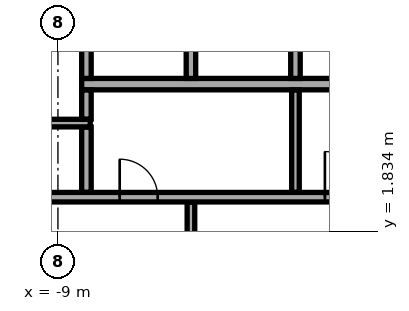
"""IFC4 building model, lengths in metres.
Left out: names, types, materials, properties, quantities, classifications, styles, units other than length and angle.
Written with IfcOpenShell. Run it as: python <this file> out.ifc"""

import sys

from ifc_helpers import new_model, si_unit, direction, frame, frame_2d, origin, place, context, subcontext, project, spatial, rectangle, extrude, element, fill, save


model = new_model("IFC4")
c1 = context("Model", 3, precision=1e-05, world=origin(), true_north=direction((0.0, 1.0)))
c2 = subcontext(c1, "Body", "Model", "MODEL_VIEW")
j1 = project(units=[si_unit("LENGTHUNIT", "METRE"), si_unit("PLANEANGLEUNIT", "RADIAN")], contexts=[c1])
p1 = place(None, origin())
s1 = spatial("IfcSite", under=j1, at=p1, CompositionType="ELEMENT")
p2 = place(p1, origin())
s2 = spatial("IfcBuilding", under=s1, at=p2, CompositionType="ELEMENT")
p3 = place(p2, frame((0.0, 0.0, 262.9)))
s3 = spatial("IfcBuildingStorey", under=s2, at=p3, CompositionType="ELEMENT", Elevation=262.9)
p4 = place(p3, frame((-8.375, 5.7, 0.0), z_axis=(0.0, 0.0, 1.0), x_axis=(1.0, 0.0, 0.0)))
e1 = element("IfcWall", 1, at=p4, inside=s3, PredefinedType="SOLIDWALL", context=c2, shape_type="SweptSolid", body=[
    extrude(rectangle(XDim=16.75, YDim=0.3, at=frame_2d((8.375, 0.0))), origin(), (0.0, 0.0, 1.0), 3.64),
])
for number, where, z_axis, x_axis in (
    (2, (-8.25, 5.85, 0.0), (0.0, 0.0, 1.0), (0.0, 1.0, 0.0)),
    (3, (-5.5, 5.85, 0.0), (0.0, 0.0, 1.0), (0.0, 1.0, 0.0)),
    (4, (-2.75, 5.85, 0.0), (0.0, 0.0, 1.0), (0.0, 1.0, 0.0)),
):
    element("IfcWall", number, at=place(p3, frame(where, z_axis=z_axis, x_axis=x_axis)), inside=s3, PredefinedType="SOLIDWALL", context=c2, shape_type="SweptSolid", body=[
        extrude(rectangle(XDim=2.7, YDim=0.25, at=frame_2d((1.35, 0.0))), origin(), (0.0, 0.0, 1.0), 3.64),
    ])
p5 = place(p3, frame((-5.5, -2.595, 0.0), z_axis=(0.0, 0.0, 1.0), x_axis=(0.0, 1.0, 0.0)))
e5 = element("IfcWall", 5, at=p5, inside=s3, PredefinedType="PARTITIONING", context=c2, shape_type="SweptSolid", body=[
    extrude(rectangle(XDim=5.19, YDim=0.2, at=frame_2d((2.595, 0.0))), origin(), (0.0, 0.0, 1.0), 3.64),
])
p6 = place(p5, frame((1.395, 0.0, 0.0)))
e6 = element("IfcOpeningElement", 6, at=p6, cuts=e5, PredefinedType="OPENING", context=c2, shape_type="SweptSolid", body=[
    extrude(rectangle(XDim=2.4, YDim=2.4, at=frame_2d((1.2, 1.2))), frame((0.0, 0.11, 0.0), z_axis=(0.0, -1.0, 0.0), x_axis=(1.0, 0.0, 0.0)), (0.0, 0.0, 1.0), 0.22),
])
p7 = place(p3, frame((-11.795, 2.725, 0.0), z_axis=(0.0, 0.0, 1.0), x_axis=(1.0, 0.0, 0.0)))
e7 = element("IfcWall", 7, at=p7, inside=s3, PredefinedType="PARTITIONING", context=c2, shape_type="SweptSolid", body=[
    extrude(rectangle(XDim=23.59, YDim=0.25, at=frame_2d((11.795, 0.0))), origin(), (0.0, 0.0, 1.0), 3.64),
])
p8 = place(p7, frame((21.345, 0.0, 0.0)))
e8 = element("IfcOpeningElement", 8, at=p8, cuts=e7, PredefinedType="OPENING", context=c2, shape_type="SweptSolid", body=[
    extrude(rectangle(XDim=0.9, YDim=2.1, at=frame_2d((0.45, 1.05))), frame((0.0, 0.135, 0.0), z_axis=(0.0, -1.0, 0.0), x_axis=(1.0, 0.0, 0.0)), (0.0, 0.0, 1.0), 0.27),
])
p9 = place(p7, frame((1.345, 0.0, 0.0)))
e9 = element("IfcOpeningElement", 9, at=p9, cuts=e7, PredefinedType="OPENING", context=c2, shape_type="SweptSolid", body=[
    extrude(rectangle(XDim=0.9, YDim=2.1, at=frame_2d((0.45, 1.05))), frame((0.0, 0.135, 0.0), z_axis=(0.0, -1.0, 0.0), x_axis=(1.0, 0.0, 0.0)), (0.0, 0.0, 1.0), 0.27),
])
p10 = place(p7, frame((4.42, 0.0, 0.0)))
e10 = element("IfcOpeningElement", 10, at=p10, cuts=e7, PredefinedType="OPENING", context=c2, shape_type="SweptSolid", body=[
    extrude(rectangle(XDim=1.0, YDim=2.1, at=frame_2d((0.5, 1.05))), frame((0.0, 0.135, 0.0), z_axis=(0.0, -1.0, 0.0), x_axis=(1.0, 0.0, 0.0)), (0.0, 0.0, 1.0), 0.27),
])
p11 = place(p7, frame((9.82, 0.0, 0.0)))
e11 = element("IfcOpeningElement", 11, at=p11, cuts=e7, PredefinedType="OPENING", context=c2, shape_type="SweptSolid", body=[
    extrude(rectangle(XDim=1.2, YDim=2.1, at=frame_2d((0.6, 1.05))), frame((0.0, 0.135, 0.0), z_axis=(0.0, -1.0, 0.0), x_axis=(1.0, 0.0, 0.0)), (0.0, 0.0, 1.0), 0.27),
])
p12 = place(p3, frame((-8.25, 2.855, 0.0), z_axis=(0.0, 0.0, 1.0), x_axis=(0.0, 1.0, 0.0)))
e12 = element("IfcWall", 12, at=p12, inside=s3, PredefinedType="PARTITIONING", context=c2, shape_type="SweptSolid", body=[
    extrude(rectangle(XDim=1.715, YDim=0.25, at=frame_2d((0.857, 0.0))), origin(), (0.0, 0.0, 1.0), 3.64),
])
p13 = place(p3, frame((-2.75, 2.855, 0.0), z_axis=(0.0, 0.0, 1.0), x_axis=(0.0, 1.0, 0.0)))
e13 = element("IfcWall", 13, at=p13, inside=s3, PredefinedType="PARTITIONING", context=c2, shape_type="SweptSolid", body=[
    extrude(rectangle(XDim=2.69, YDim=0.2, at=frame_2d((1.345, 0.0))), origin(), (0.0, 0.0, 1.0), 3.64),
])
p14 = place(p3, frame((-11.795, 4.675, 0.0), z_axis=(0.0, 0.0, 1.0), x_axis=(1.0, 0.0, 0.0)))
e14 = element("IfcWall", 14, at=p14, inside=s3, PredefinedType="PARTITIONING", context=c2, shape_type="SweptSolid", body=[
    extrude(rectangle(XDim=3.645, YDim=0.2, at=frame_2d((1.823, 0.0))), origin(), (0.0, 0.0, 1.0), 3.64),
])
p15 = place(p3, frame((-8.25, 4.78, 0.0), z_axis=(0.0, 0.0, 1.0), x_axis=(0.0, 1.0, 0.0)))
e15 = element("IfcWall", 15, at=p15, inside=s3, PredefinedType="PARTITIONING", context=c2, shape_type="SweptSolid", body=[
    extrude(rectangle(XDim=0.765, YDim=0.25, at=frame_2d((0.382, 0.0))), origin(), (0.0, 0.0, 1.0), 3.64),
])
p16 = place(p3, frame((-8.015, 32.917, 0.0), z_axis=(0.0, 0.0, 1.0), x_axis=(-0.500001675963, -0.866024436165, 0.0)))
e16 = element("IfcWall", 16, at=p16, inside=s3, PredefinedType="STANDARD", context=c2, shape_type="SweptSolid", body=[
    extrude(rectangle(XDim=48.843, YDim=0.6, at=frame_2d((24.421, 0.0))), origin(), (0.0, 0.0, 1.0), 3.64),
])
p17 = place(p16, frame((1.22, 0.0, 0.9)))
e17 = element("IfcOpeningElement", 17, at=p17, cuts=e16, PredefinedType="OPENING", context=c2, shape_type="SweptSolid", body=[
    extrude(rectangle(XDim=2.0, YDim=2.1, at=frame_2d((1.0, 1.05))), frame((0.0, 0.31, 0.0), z_axis=(0.0, -1.0, 0.0), x_axis=(1.0, 0.0, 0.0)), (0.0, 0.0, 1.0), 0.62),
])
p18 = place(p16, frame((5.66, 0.0, 0.9)))
e18 = element("IfcOpeningElement", 18, at=p18, cuts=e16, PredefinedType="OPENING", context=c2, shape_type="SweptSolid", body=[
    extrude(rectangle(XDim=2.0, YDim=2.1, at=frame_2d((1.0, 1.05))), frame((0.0, 0.31, 0.0), z_axis=(0.0, -1.0, 0.0), x_axis=(1.0, 0.0, 0.0)), (0.0, 0.0, 1.0), 0.62),
])
p19 = place(p16, frame((10.101, 0.0, 0.9)))
e19 = element("IfcOpeningElement", 19, at=p19, cuts=e16, PredefinedType="OPENING", context=c2, shape_type="SweptSolid", body=[
    extrude(rectangle(XDim=2.0, YDim=2.1, at=frame_2d((1.0, 1.05))), frame((0.0, 0.31, 0.0), z_axis=(0.0, -1.0, 0.0), x_axis=(1.0, 0.0, 0.0)), (0.0, 0.0, 1.0), 0.62),
])
p20 = place(p16, frame((14.541, 0.0, 0.9)))
e20 = element("IfcOpeningElement", 20, at=p20, cuts=e16, PredefinedType="OPENING", context=c2, shape_type="SweptSolid", body=[
    extrude(rectangle(XDim=2.0, YDim=2.1, at=frame_2d((1.0, 1.05))), frame((0.0, 0.31, 0.0), z_axis=(0.0, -1.0, 0.0), x_axis=(1.0, 0.0, 0.0)), (0.0, 0.0, 1.0), 0.62),
])
p21 = place(p16, frame((18.981, 0.0, 0.9)))
e21 = element("IfcOpeningElement", 21, at=p21, cuts=e16, PredefinedType="OPENING", context=c2, shape_type="SweptSolid", body=[
    extrude(rectangle(XDim=2.0, YDim=2.1, at=frame_2d((1.0, 1.05))), frame((0.0, 0.31, 0.0), z_axis=(0.0, -1.0, 0.0), x_axis=(1.0, 0.0, 0.0)), (0.0, 0.0, 1.0), 0.62),
])
p22 = place(p16, frame((23.422, 0.0, 0.9)))
e22 = element("IfcOpeningElement", 22, at=p22, cuts=e16, PredefinedType="OPENING", context=c2, shape_type="SweptSolid", body=[
    extrude(rectangle(XDim=2.0, YDim=2.1, at=frame_2d((1.0, 1.05))), frame((0.0, 0.31, 0.0), z_axis=(0.0, -1.0, 0.0), x_axis=(1.0, 0.0, 0.0)), (0.0, 0.0, 1.0), 0.62),
])
p23 = place(p16, frame((27.862, 0.0, 0.9)))
e23 = element("IfcOpeningElement", 23, at=p23, cuts=e16, PredefinedType="OPENING", context=c2, shape_type="SweptSolid", body=[
    extrude(rectangle(XDim=2.0, YDim=2.1, at=frame_2d((1.0, 1.05))), frame((0.0, 0.31, 0.0), z_axis=(0.0, -1.0, 0.0), x_axis=(1.0, 0.0, 0.0)), (0.0, 0.0, 1.0), 0.62),
])
p24 = place(p16, frame((32.302, 0.0, 0.9)))
e24 = element("IfcOpeningElement", 24, at=p24, cuts=e16, PredefinedType="OPENING", context=c2, shape_type="SweptSolid", body=[
    extrude(rectangle(XDim=2.0, YDim=2.1, at=frame_2d((1.0, 1.05))), frame((0.0, 0.31, 0.0), z_axis=(0.0, -1.0, 0.0), x_axis=(1.0, 0.0, 0.0)), (0.0, 0.0, 1.0), 0.62),
])
p25 = place(p16, frame((36.742, 0.0, 0.9)))
e25 = element("IfcOpeningElement", 25, at=p25, cuts=e16, PredefinedType="OPENING", context=c2, shape_type="SweptSolid", body=[
    extrude(rectangle(XDim=2.0, YDim=2.1, at=frame_2d((1.0, 1.05))), frame((0.0, 0.31, 0.0), z_axis=(0.0, -1.0, 0.0), x_axis=(1.0, 0.0, 0.0)), (0.0, 0.0, 1.0), 0.62),
])
p26 = place(p16, frame((41.183, 0.0, 0.9)))
e26 = element("IfcOpeningElement", 26, at=p26, cuts=e16, PredefinedType="OPENING", context=c2, shape_type="SweptSolid", body=[
    extrude(rectangle(XDim=2.0, YDim=2.1, at=frame_2d((1.0, 1.05))), frame((0.0, 0.31, 0.0), z_axis=(0.0, -1.0, 0.0), x_axis=(1.0, 0.0, 0.0)), (0.0, 0.0, 1.0), 0.62),
])
p27 = place(p16, frame((45.623, 0.0, 0.9)))
e27 = element("IfcOpeningElement", 27, at=p27, cuts=e16, PredefinedType="OPENING", context=c2, shape_type="SweptSolid", body=[
    extrude(rectangle(XDim=2.0, YDim=2.1, at=frame_2d((1.0, 1.05))), frame((0.0, 0.31, 0.0), z_axis=(0.0, -1.0, 0.0), x_axis=(1.0, 0.0, 0.0)), (0.0, 0.0, 1.0), 0.62),
])
p28 = place(p10, origin())
e28 = element("IfcDoor", 28, at=p28, inside=s3, OperationType="SINGLE_SWING_LEFT", PredefinedType="DOOR", context=c2, shape_type="SweptSolid", body=[
    extrude(rectangle(XDim=1.0, YDim=2.1, at=frame_2d((0.5, 1.05))), frame((0.0, 0.025, 0.0), z_axis=(0.0, -1.0, 0.0), x_axis=(1.0, 0.0, 0.0)), (0.0, 0.0, 1.0), 0.05),
])
fill(e10, e28)
p29 = place(p11, origin())
e29 = element("IfcDoor", 29, at=p29, inside=s3, OperationType="SINGLE_SWING_LEFT", PredefinedType="DOOR", context=c2, shape_type="SweptSolid", body=[
    extrude(rectangle(XDim=1.2, YDim=2.1, at=frame_2d((0.6, 1.05))), frame((0.0, 0.025, 0.0), z_axis=(0.0, -1.0, 0.0), x_axis=(1.0, 0.0, 0.0)), (0.0, 0.0, 1.0), 0.05),
])
fill(e11, e29)
save(model, sys.argv[1])
